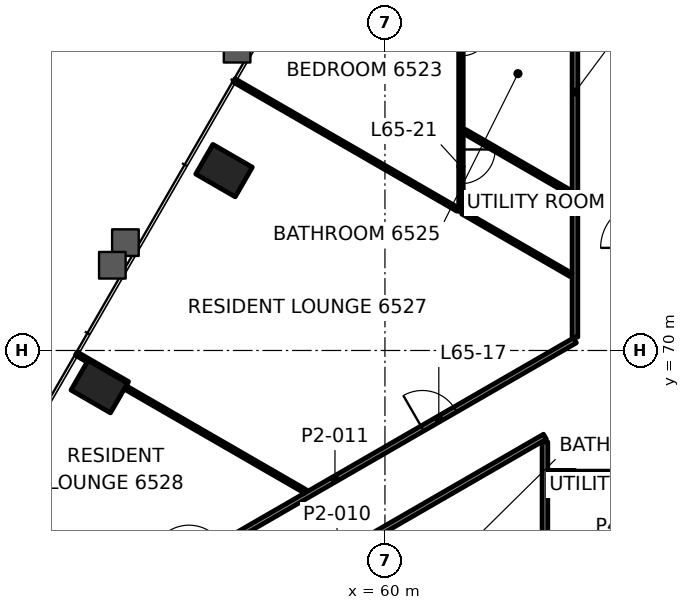
"""IFC4 building model, lengths in metres.
Left out: names, types, materials, properties, quantities, classifications, styles, units other than length and angle.
Written with IfcOpenShell. Run it as: python <this file> out.ifc"""

import sys

from ifc_helpers import new_model, si_unit, direction, frame, frame_2d, origin, origin_2d, place, context, subcontext, project, spatial, rectangle, hollow_rectangle, extrude, element, fill, save


model = new_model("IFC4")
c1 = context("Model", 3, precision=1e-05, world=origin(), true_north=direction((0.0, 1.0)))
c2 = subcontext(c1, "Body", "Model", "MODEL_VIEW")
j1 = project(units=[si_unit("LENGTHUNIT", "METRE"), si_unit("PLANEANGLEUNIT", "RADIAN")], contexts=[c1])
p1 = place(None, origin())
s1 = spatial("IfcSite", under=j1, at=p1, CompositionType="ELEMENT")
p2 = place(p1, origin())
s2 = spatial("IfcBuilding", under=s1, at=p2, CompositionType="ELEMENT")
p3 = place(p2, frame((0.0, 0.0, 274.1)))
s3 = spatial("IfcBuildingStorey", under=s2, at=p3, CompositionType="ELEMENT", Elevation=274.1)
for number, where, z_axis, x_axis in (
    (1, (55.766, 74.733, -0.0), (0.0, 0.0, 1.0), (-0.5, -0.866, 0.0)),
    (2, (52.483, 69.047, -0.0), (0.0, 0.0, 1.0), (-0.5, -0.866, 0.0)),
):
    element("IfcColumn", number, at=place(p3, frame(where, z_axis=z_axis, x_axis=x_axis)), inside=s3, PredefinedType="COLUMN", context=c2, shape_type="SweptSolid", body=[
        extrude(hollow_rectangle(XDim=0.9, YDim=1.2, WallThickness=0.06, at=origin_2d()), origin(), (0.0, 0.0, 1.0), 3.5),
    ])
p4 = place(p3, frame((85.0, 66.75, 0.0), z_axis=(0.0, 0.0, 1.0), x_axis=(-1.0, 0.0, 0.0)))
e3 = element("IfcWall", 3, at=p4, inside=s3, PredefinedType="PARTITIONING", context=c2, shape_type="SweptSolid", body=[
    extrude(rectangle(XDim=19.999, YDim=0.15, at=frame_2d((10.0, 0.0))), origin(), (0.0, 0.0, 1.0), 2.7),
])
p5 = place(p4, frame((2.96, 0.0, 0.0)))
e4 = element("IfcOpeningElement", 4, at=p5, cuts=e3, PredefinedType="OPENING", context=c2, shape_type="SweptSolid", body=[
    extrude(rectangle(XDim=1.0, YDim=2.1, at=frame_2d((0.5, 1.05))), frame((0.0, 0.085, 0.0), z_axis=(0.0, -1.0, 0.0), x_axis=(1.0, 0.0, 0.0)), (0.0, 0.0, 1.0), 0.17),
])
p6 = place(p4, frame((7.361, 0.0, 0.0)))
e5 = element("IfcOpeningElement", 5, at=p6, cuts=e3, PredefinedType="OPENING", context=c2, shape_type="SweptSolid", body=[
    extrude(rectangle(XDim=0.9, YDim=2.1, at=frame_2d((0.45, 1.05))), frame((0.0, 0.085, 0.0), z_axis=(0.0, -1.0, 0.0), x_axis=(1.0, 0.0, 0.0)), (0.0, 0.0, 1.0), 0.17),
])
p7 = place(p4, frame((9.55, 0.0, 0.0)))
e6 = element("IfcOpeningElement", 6, at=p7, cuts=e3, PredefinedType="OPENING", context=c2, shape_type="SweptSolid", body=[
    extrude(rectangle(XDim=0.9, YDim=2.1, at=frame_2d((0.45, 1.05))), frame((0.0, 0.085, 0.0), z_axis=(0.0, -1.0, 0.0), x_axis=(1.0, 0.0, 0.0)), (0.0, 0.0, 1.0), 0.17),
])
p8 = place(p4, frame((11.738, 0.0, 0.0)))
e7 = element("IfcOpeningElement", 7, at=p8, cuts=e3, PredefinedType="OPENING", context=c2, shape_type="SweptSolid", body=[
    extrude(rectangle(XDim=0.9, YDim=2.1, at=frame_2d((0.45, 1.05))), frame((0.0, 0.085, 0.0), z_axis=(0.0, -1.0, 0.0), x_axis=(1.0, 0.0, 0.0)), (0.0, 0.0, 1.0), 0.17),
])
p9 = place(p4, frame((13.926, 0.0, 0.0)))
e8 = element("IfcOpeningElement", 8, at=p9, cuts=e3, PredefinedType="OPENING", context=c2, shape_type="SweptSolid", body=[
    extrude(rectangle(XDim=0.9, YDim=2.1, at=frame_2d((0.45, 1.05))), frame((0.0, 0.085, 0.0), z_axis=(0.0, -1.0, 0.0), x_axis=(1.0, 0.0, 0.0)), (0.0, 0.0, 1.0), 0.17),
])
p10 = place(p3, frame((64.295, 66.769, 0.0), z_axis=(0.0, 0.0, 1.0), x_axis=(1.0, 0.0, 0.0)))
e9 = element("IfcWall", 9, at=p10, inside=s3, PredefinedType="PARTITIONING", context=c2, shape_type="SweptSolid", body=[
    extrude(rectangle(XDim=0.705, YDim=0.15, at=frame_2d((0.353, 0.0))), origin(), (0.0, 0.0, 1.0), 2.7),
])
p11 = place(p3, frame((64.21, 67.731, 0.0), z_axis=(0.0, 0.0, 1.0), x_axis=(-0.866027247007, -0.499996807431, 0.0)))
e10 = element("IfcWall", 10, at=p11, inside=s3, PredefinedType="PARTITIONING", context=c2, shape_type="SweptSolid", body=[
    extrude(rectangle(XDim=12.633, YDim=0.15, at=frame_2d((6.316, 0.0))), origin(), (0.0, 0.0, 1.0), 2.547),
])
p12 = place(p11, frame((8.143, 0.0, 0.0)))
e11 = element("IfcOpeningElement", 11, at=p12, cuts=e10, PredefinedType="OPENING", context=c2, shape_type="SweptSolid", body=[
    extrude(rectangle(XDim=1.0, YDim=2.1, at=frame_2d((0.5, 1.05))), frame((0.0, 0.085, 0.0), z_axis=(0.0, -1.0, 0.0), x_axis=(1.0, 0.0, 0.0)), (0.0, 0.0, 1.0), 0.17),
])
p13 = place(p3, frame((52.37, 62.974, 0.0), z_axis=(0.0, 0.0, 1.0), x_axis=(0.866025849409, 0.499999228155, 0.0)))
e12 = element("IfcWall", 12, at=p13, inside=s3, PredefinedType="PARTITIONING", context=c2, shape_type="SweptSolid", body=[
    extrude(rectangle(XDim=14.584, YDim=0.15, at=frame_2d((7.292, 0.0))), origin(), (0.0, 0.0, 1.0), 2.7),
])
p14 = place(p13, frame((2.858, 0.0, 0.0)))
e13 = element("IfcOpeningElement", 13, at=p14, cuts=e12, PredefinedType="OPENING", context=c2, shape_type="SweptSolid", body=[
    extrude(rectangle(XDim=1.0, YDim=2.1, at=frame_2d((0.5, 1.05))), frame((0.0, 0.085, 0.0), z_axis=(0.0, -1.0, 0.0), x_axis=(1.0, 0.0, 0.0)), (0.0, 0.0, 1.0), 0.17),
])
p15 = place(p13, frame((9.947, 0.0, 0.0)))
e14 = element("IfcOpeningElement", 14, at=p15, cuts=e12, PredefinedType="OPENING", context=c2, shape_type="SweptSolid", body=[
    extrude(rectangle(XDim=1.0, YDim=2.1, at=frame_2d((0.5, 1.05))), frame((0.0, 0.085, 0.0), z_axis=(0.0, -1.0, 0.0), x_axis=(1.0, 0.0, 0.0)), (0.0, 0.0, 1.0), 0.17),
])
p16 = place(p3, frame((65.0, 70.352, 0.0), z_axis=(0.0, 0.0, 1.0), x_axis=(0.0, 1.0, 0.0)))
e15 = element("IfcWall", 15, at=p16, inside=s3, PredefinedType="PARTITIONING", context=c2, shape_type="SweptSolid", body=[
    extrude(rectangle(XDim=12.898, YDim=0.15, at=frame_2d((6.449, 0.0))), origin(), (0.0, 0.0, 1.0), 2.7),
])
p17 = place(p3, frame((64.21, 63.81, 0.0), z_axis=(0.0, 0.0, 1.0), x_axis=(0.0, 1.0, 0.0)))
e16 = element("IfcWall", 16, at=p17, inside=s3, PredefinedType="PARTITIONING", context=c2, shape_type="SweptSolid", body=[
    extrude(rectangle(XDim=3.784, YDim=0.15, at=frame_2d((1.892, 0.0))), origin(), (0.0, 0.0, 1.0), 2.547),
])
p18 = place(p3, frame((62.0, 85.776, 0.0), z_axis=(0.0, 0.0, 1.0), x_axis=(0.0, -1.0, 0.0)))
e17 = element("IfcWall", 17, at=p18, inside=s3, PredefinedType="PARTITIONING", context=c2, shape_type="SweptSolid", body=[
    extrude(rectangle(XDim=12.115, YDim=0.12, at=frame_2d((6.058, 0.0))), origin(), (0.0, 0.0, 1.0), 2.688),
])
p19 = place(p18, frame((7.226, 0.0, 0.0)))
e18 = element("IfcOpeningElement", 18, at=p19, cuts=e17, PredefinedType="OPENING", context=c2, shape_type="SweptSolid", body=[
    extrude(rectangle(XDim=0.8, YDim=2.1, at=frame_2d((0.4, 1.05))), frame((0.0, 0.07, 0.0), z_axis=(0.0, -1.0, 0.0), x_axis=(1.0, 0.0, 0.0)), (0.0, 0.0, 1.0), 0.14),
])
p20 = place(p18, frame((10.487, 0.0, 0.0)))
e19 = element("IfcOpeningElement", 19, at=p20, cuts=e17, PredefinedType="OPENING", context=c2, shape_type="SweptSolid", body=[
    extrude(rectangle(XDim=0.9, YDim=2.1, at=frame_2d((0.45, 1.05))), frame((0.0, 0.07, 0.0), z_axis=(0.0, -1.0, 0.0), x_axis=(1.0, 0.0, 0.0)), (0.0, 0.0, 1.0), 0.14),
])
p21 = place(p3, frame((64.891, 74.149, 0.0), z_axis=(0.0, 0.0, 1.0), x_axis=(-0.866019355129, 0.500010476433, 0.0)))
e20 = element("IfcWall", 20, at=p21, inside=s3, PredefinedType="PARTITIONING", context=c2, shape_type="SweptSolid", body=[
    extrude(rectangle(XDim=3.229, YDim=0.12, at=frame_2d((1.614, 0.0))), origin(), (0.0, 0.0, 1.0), 2.7),
])
p22 = place(p3, frame((64.899, 71.987, 0.0), z_axis=(0.0, 0.0, 1.0), x_axis=(-0.866032610133, 0.499987518031, 0.0)))
e21 = element("IfcWall", 21, at=p22, inside=s3, PredefinedType="PARTITIONING", context=c2, shape_type="SweptSolid", body=[
    extrude(rectangle(XDim=3.295, YDim=0.1, at=frame_2d((1.648, 0.0))), origin(), (0.0, 0.0, 1.0), 2.7),
])
p23 = place(p3, frame((53.228, 69.138, 0.0), z_axis=(0.0, 0.0, 1.0), x_axis=(-0.866018739521, 0.500011542666, 0.0)))
e22 = element("IfcWall", 22, at=p23, inside=s3, PredefinedType="PARTITIONING", context=c2, shape_type="SweptSolid", body=[
    extrude(rectangle(XDim=1.56, YDim=0.1, at=frame_2d((0.78, 0.0))), origin(), (0.0, 0.0, 1.0), 2.7),
])
p24 = place(p3, frame((57.91, 66.289, 0.0), z_axis=(0.0, 0.0, 1.0), x_axis=(-0.866026762963, 0.499997645826, 0.0)))
e23 = element("IfcWall", 23, at=p24, inside=s3, PredefinedType="PARTITIONING", context=c2, shape_type="SweptSolid", body=[
    extrude(rectangle(XDim=5.478, YDim=0.1, at=frame_2d((2.739, 0.0))), origin(), (0.0, 0.0, 1.0), 2.7),
])
p25 = place(p3, frame((61.915, 73.71, 0.0), z_axis=(0.0, 0.0, 1.0), x_axis=(-0.866024081565, 0.500002290144, 0.0)))
e24 = element("IfcWall", 24, at=p25, inside=s3, PredefinedType="PARTITIONING", context=c2, shape_type="SweptSolid", body=[
    extrude(rectangle(XDim=6.797, YDim=0.1, at=frame_2d((3.398, 0.0))), origin(), (0.0, 0.0, 1.0), 2.688),
])
p26 = place(p15, origin())
e25 = element("IfcDoor", 25, at=p26, inside=s3, OperationType="SINGLE_SWING_RIGHT", PredefinedType="DOOR", context=c2, shape_type="SweptSolid", body=[
    extrude(rectangle(XDim=1.0, YDim=2.1, at=frame_2d((0.5, 1.05))), frame((0.0, 0.025, 0.0), z_axis=(0.0, -1.0, 0.0), x_axis=(1.0, 0.0, 0.0)), (0.0, 0.0, 1.0), 0.05),
])
fill(e14, e25)
p27 = place(p19, origin())
e26 = element("IfcDoor", 26, at=p27, inside=s3, OperationType="SINGLE_SWING_RIGHT", PredefinedType="DOOR", context=c2, shape_type="SweptSolid", body=[
    extrude(rectangle(XDim=0.8, YDim=2.1, at=frame_2d((0.4, 1.05))), frame((0.0, 0.025, 0.0), z_axis=(0.0, -1.0, 0.0), x_axis=(1.0, 0.0, 0.0)), (0.0, 0.0, 1.0), 0.05),
])
fill(e18, e26)
p28 = place(p20, origin())
e27 = element("IfcDoor", 27, at=p28, inside=s3, OperationType="SINGLE_SWING_LEFT", PredefinedType="DOOR", context=c2, shape_type="SweptSolid", body=[
    extrude(rectangle(XDim=0.9, YDim=2.1, at=frame_2d((0.45, 1.05))), frame((0.0, 0.025, 0.0), z_axis=(0.0, -1.0, 0.0), x_axis=(1.0, 0.0, 0.0)), (0.0, 0.0, 1.0), 0.05),
])
fill(e19, e27)
save(model, sys.argv[1])
